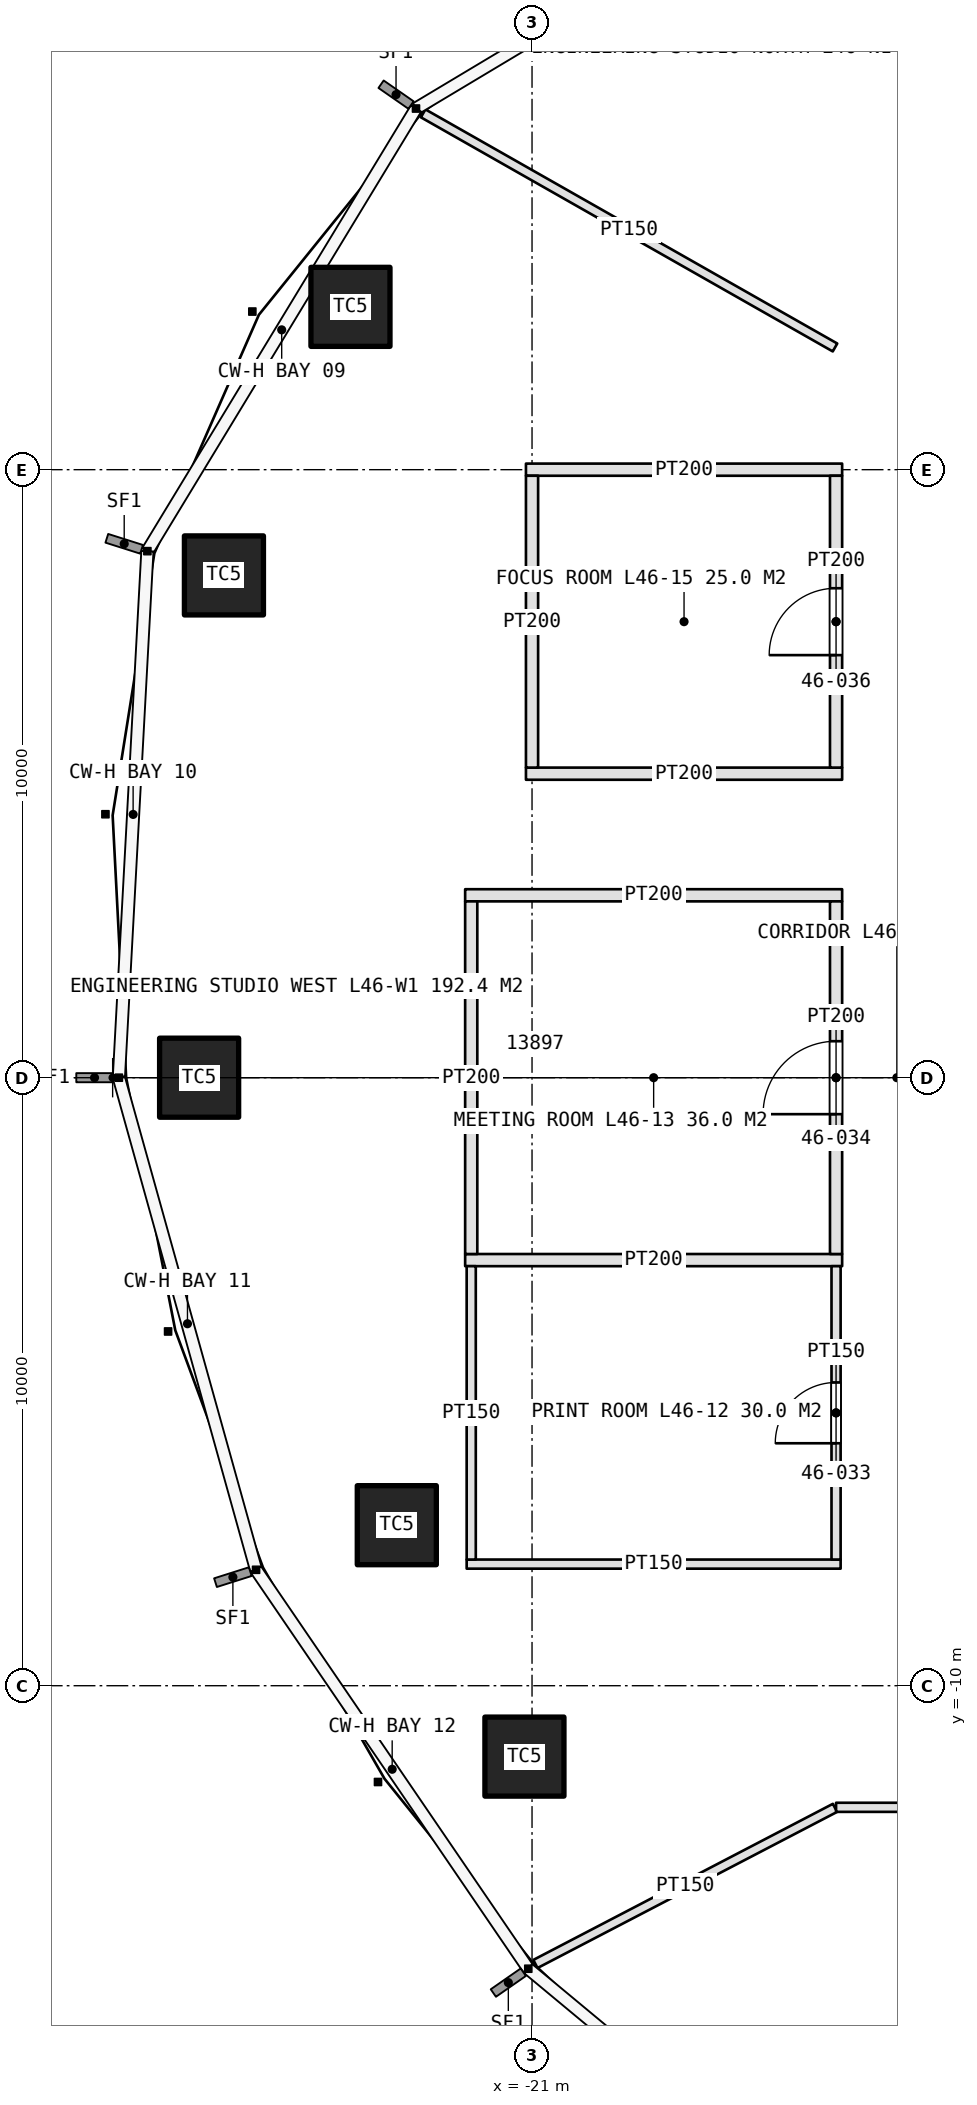
"""IFC4 building model, lengths in metres.
Left out: names, types, materials, properties, quantities, classifications, styles, units other than length and angle.
Written with IfcOpenShell. Run it as: python <this file> out.ifc"""

import sys

from ifc_helpers import new_model, si_unit, direction, frame, frame_2d, origin, origin_2d, place, context, subcontext, project, spatial, rectangle, extrude, element, fill, save


model = new_model("IFC4")
c1 = context("Model", 3, precision=1e-05, world=origin(), true_north=direction((0.0, 1.0)))
c2 = subcontext(c1, "Body", "Model", "MODEL_VIEW")
j1 = project(units=[si_unit("LENGTHUNIT", "METRE"), si_unit("PLANEANGLEUNIT", "RADIAN")], contexts=[c1])
p1 = place(None, origin())
s1 = spatial("IfcSite", under=j1, at=p1, CompositionType="ELEMENT")
p2 = place(p1, origin())
s2 = spatial("IfcBuilding", under=s1, at=p2, CompositionType="ELEMENT")
p3 = place(p2, frame((0.0, 0.0, 211.6)))
s3 = spatial("IfcBuildingStorey", under=s2, at=p3, CompositionType="ELEMENT", Elevation=211.6)
for number, where, z_axis, x_axis in (
    (1, (-23.986, 12.678, 0.0), (0.0, 0.0, 1.0), (1.0, 0.0, 0.0)),
    (2, (-26.067, 8.261, 0.0), (0.0, 0.0, 1.0), (1.0, 0.0, 0.0)),
    (3, (-26.475, 0.0, 0.0), (0.0, 0.0, 1.0), (1.0, 0.0, 0.0)),
    (4, (-23.224, -7.36, 0.0), (0.0, 0.0, 1.0), (1.0, 0.0, 0.0)),
    (5, (-21.125, -11.166, 0.0), (0.0, 0.0, 1.0), (1.0, 0.0, 0.0)),
):
    element("IfcColumn", number, at=place(p3, frame(where, z_axis=z_axis, x_axis=x_axis)), inside=s3, PredefinedType="COLUMN", context=c2, shape_type="SweptSolid", body=[
        extrude(rectangle(XDim=1.3, YDim=1.3, at=origin_2d()), origin(), (0.0, 0.0, 1.0), 4.2),
    ])
p4 = place(p3, frame((-15.925, -8.0, 0.0), z_axis=(0.0, 0.0, 1.0), x_axis=(-1.0, 0.0, 0.0)))
e6 = element("IfcWall", 6, at=p4, inside=s3, PredefinedType="PARTITIONING", context=c2, shape_type="SweptSolid", body=[
    extrude(rectangle(XDim=6.15, YDim=0.15, at=frame_2d((3.075, 0.0))), origin(), (0.0, 0.0, 1.0), 3.0),
])
for number, where, z_axis, x_axis in (
    (7, (-15.9, -3.0, 0.0), (0.0, 0.0, 1.0), (-1.0, 0.0, 0.0)),
    (8, (-15.9, 3.0, 0.0), (0.0, 0.0, 1.0), (-1.0, 0.0, 0.0)),
):
    element("IfcWall", number, at=place(p3, frame(where, z_axis=z_axis, x_axis=x_axis)), inside=s3, PredefinedType="PARTITIONING", context=c2, shape_type="SweptSolid", body=[
        extrude(rectangle(XDim=6.2, YDim=0.2, at=frame_2d((3.1, 0.0))), origin(), (0.0, 0.0, 1.0), 3.0),
    ])
p5 = place(p3, frame((-16.0, -7.925, 0.0), z_axis=(0.0, 0.0, 1.0), x_axis=(0.0, 1.0, 0.0)))
e9 = element("IfcWall", 9, at=p5, inside=s3, PredefinedType="PARTITIONING", context=c2, shape_type="SweptSolid", body=[
    extrude(rectangle(XDim=4.825, YDim=0.15, at=frame_2d((2.413, 0.0))), origin(), (0.0, 0.0, 1.0), 3.0),
])
p6 = place(p5, frame((1.913, 0.0, 0.0)))
e10 = element("IfcOpeningElement", 10, at=p6, cuts=e9, PredefinedType="OPENING", context=c2, shape_type="SweptSolid", body=[
    extrude(rectangle(XDim=1.0, YDim=2.2, at=frame_2d((0.5, 1.1))), frame((0.0, 0.085, 0.0), z_axis=(0.0, -1.0, 0.0), x_axis=(1.0, 0.0, 0.0)), (0.0, 0.0, 1.0), 0.17),
])
p7 = place(p3, frame((-22.0, -7.925, 0.0), z_axis=(0.0, 0.0, 1.0), x_axis=(0.0, 1.0, 0.0)))
e11 = element("IfcWall", 11, at=p7, inside=s3, PredefinedType="PARTITIONING", context=c2, shape_type="SweptSolid", body=[
    extrude(rectangle(XDim=4.825, YDim=0.15, at=frame_2d((2.413, 0.0))), origin(), (0.0, 0.0, 1.0), 3.0),
])
p8 = place(p3, frame((-16.0, -2.9, 0.0), z_axis=(0.0, 0.0, 1.0), x_axis=(0.0, 1.0, 0.0)))
e12 = element("IfcWall", 12, at=p8, inside=s3, PredefinedType="PARTITIONING", context=c2, shape_type="SweptSolid", body=[
    extrude(rectangle(XDim=5.8, YDim=0.2, at=frame_2d((2.9, 0.0))), origin(), (0.0, 0.0, 1.0), 3.0),
])
p9 = place(p8, frame((2.3, 0.0, 0.0)))
e13 = element("IfcOpeningElement", 13, at=p9, cuts=e12, PredefinedType="OPENING", context=c2, shape_type="SweptSolid", body=[
    extrude(rectangle(XDim=1.2, YDim=2.4, at=frame_2d((0.6, 1.2))), frame((0.0, 0.11, 0.0), z_axis=(0.0, -1.0, 0.0), x_axis=(1.0, 0.0, 0.0)), (0.0, 0.0, 1.0), 0.22),
])
p10 = place(p3, frame((-22.0, -2.9, 0.0), z_axis=(0.0, 0.0, 1.0), x_axis=(0.0, 1.0, 0.0)))
e14 = element("IfcWall", 14, at=p10, inside=s3, PredefinedType="PARTITIONING", context=c2, shape_type="SweptSolid", body=[
    extrude(rectangle(XDim=5.8, YDim=0.2, at=frame_2d((2.9, 0.0))), origin(), (0.0, 0.0, 1.0), 3.0),
])
for number, where, z_axis, x_axis in (
    (15, (-15.9, 5.0, 0.0), (0.0, 0.0, 1.0), (-1.0, 0.0, 0.0)),
    (16, (-15.9, 10.0, 0.0), (0.0, 0.0, 1.0), (-1.0, 0.0, 0.0)),
):
    element("IfcWall", number, at=place(p3, frame(where, z_axis=z_axis, x_axis=x_axis)), inside=s3, PredefinedType="PARTITIONING", context=c2, shape_type="SweptSolid", body=[
        extrude(rectangle(XDim=5.2, YDim=0.2, at=frame_2d((2.6, 0.0))), origin(), (0.0, 0.0, 1.0), 3.0),
    ])
p11 = place(p3, frame((-16.0, 5.1, 0.0), z_axis=(0.0, 0.0, 1.0), x_axis=(0.0, 1.0, 0.0)))
e17 = element("IfcWall", 17, at=p11, inside=s3, PredefinedType="PARTITIONING", context=c2, shape_type="SweptSolid", body=[
    extrude(rectangle(XDim=4.8, YDim=0.2, at=frame_2d((2.4, 0.0))), origin(), (0.0, 0.0, 1.0), 3.0),
])
p12 = place(p11, frame((1.85, 0.0, 0.0)))
e18 = element("IfcOpeningElement", 18, at=p12, cuts=e17, PredefinedType="OPENING", context=c2, shape_type="SweptSolid", body=[
    extrude(rectangle(XDim=1.1, YDim=2.3, at=frame_2d((0.55, 1.15))), frame((0.0, 0.11, 0.0), z_axis=(0.0, -1.0, 0.0), x_axis=(1.0, 0.0, 0.0)), (0.0, 0.0, 1.0), 0.22),
])
p13 = place(p3, frame((-21.0, 5.1, 0.0), z_axis=(0.0, 0.0, 1.0), x_axis=(0.0, 1.0, 0.0)))
e19 = element("IfcWall", 19, at=p13, inside=s3, PredefinedType="PARTITIONING", context=c2, shape_type="SweptSolid", body=[
    extrude(rectangle(XDim=4.8, YDim=0.2, at=frame_2d((2.4, 0.0))), origin(), (0.0, 0.0, 1.0), 3.0),
])
p14 = place(p3, frame((-16.018, -12.009, 0.0), z_axis=(0.0, 0.0, 1.0), x_axis=(-0.886831549241, -0.462092851351, 0.0)))
e20 = element("IfcWall", 20, at=p14, inside=s3, PredefinedType="PARTITIONING", context=c2, shape_type="SweptSolid", body=[
    extrude(rectangle(XDim=5.555, YDim=0.15, at=frame_2d((2.778, 0.0))), origin(), (0.0, 0.0, 1.0), 3.0),
])
p15 = place(p3, frame((-16.017, 12.01, 0.0), z_axis=(0.0, 0.0, 1.0), x_axis=(-0.869357432803, 0.494183826151, 0.0)))
e21 = element("IfcWall", 21, at=p15, inside=s3, PredefinedType="PARTITIONING", context=c2, shape_type="SweptSolid", body=[
    extrude(rectangle(XDim=7.791, YDim=0.15, at=frame_2d((3.896, 0.0))), origin(), (0.0, 0.0, 1.0), 3.0),
])
p16 = place(p3, frame((-16.0, -12.0, 0.0), z_axis=(0.0, 0.0, 1.0), x_axis=(1.0, 0.0, 0.0)))
e22 = element("IfcWall", 22, at=p16, inside=s3, PredefinedType="PARTITIONING", context=c2, shape_type="SweptSolid", body=[
    extrude(rectangle(XDim=6.0, YDim=0.15, at=frame_2d((3.0, 0.0))), origin(), (0.0, 0.0, 1.0), 3.0),
])
p17 = place(p16, frame((3.9, 0.0, 0.0)))
e23 = element("IfcOpeningElement", 23, at=p17, cuts=e22, PredefinedType="OPENING", context=c2, shape_type="SweptSolid", body=[
    extrude(rectangle(XDim=1.6, YDim=2.4, at=frame_2d((0.8, 1.2))), frame((0.0, 0.085, 0.0), z_axis=(0.0, -1.0, 0.0), x_axis=(1.0, 0.0, 0.0)), (0.0, 0.0, 1.0), 0.17),
])
p18 = place(p6, origin())
e24 = element("IfcDoor", 24, at=p18, inside=s3, OperationType="SINGLE_SWING_LEFT", PredefinedType="DOOR", context=c2, shape_type="SweptSolid", body=[
    extrude(rectangle(XDim=1.0, YDim=2.2, at=frame_2d((0.5, 1.1))), frame((0.0, 0.025, 0.0), z_axis=(0.0, -1.0, 0.0), x_axis=(1.0, 0.0, 0.0)), (0.0, 0.0, 1.0), 0.05),
])
fill(e10, e24)
p19 = place(p9, origin())
e25 = element("IfcDoor", 25, at=p19, inside=s3, OperationType="SINGLE_SWING_LEFT", PredefinedType="DOOR", context=c2, shape_type="SweptSolid", body=[
    extrude(rectangle(XDim=1.2, YDim=2.4, at=frame_2d((0.6, 1.2))), frame((0.0, 0.025, 0.0), z_axis=(0.0, -1.0, 0.0), x_axis=(1.0, 0.0, 0.0)), (0.0, 0.0, 1.0), 0.05),
])
fill(e13, e25)
p20 = place(p12, origin())
e26 = element("IfcDoor", 26, at=p20, inside=s3, OperationType="SINGLE_SWING_LEFT", PredefinedType="DOOR", context=c2, shape_type="SweptSolid", body=[
    extrude(rectangle(XDim=1.1, YDim=2.3, at=frame_2d((0.55, 1.15))), frame((0.0, 0.025, 0.0), z_axis=(0.0, -1.0, 0.0), x_axis=(1.0, 0.0, 0.0)), (0.0, 0.0, 1.0), 0.05),
])
fill(e18, e26)
save(model, sys.argv[1])
